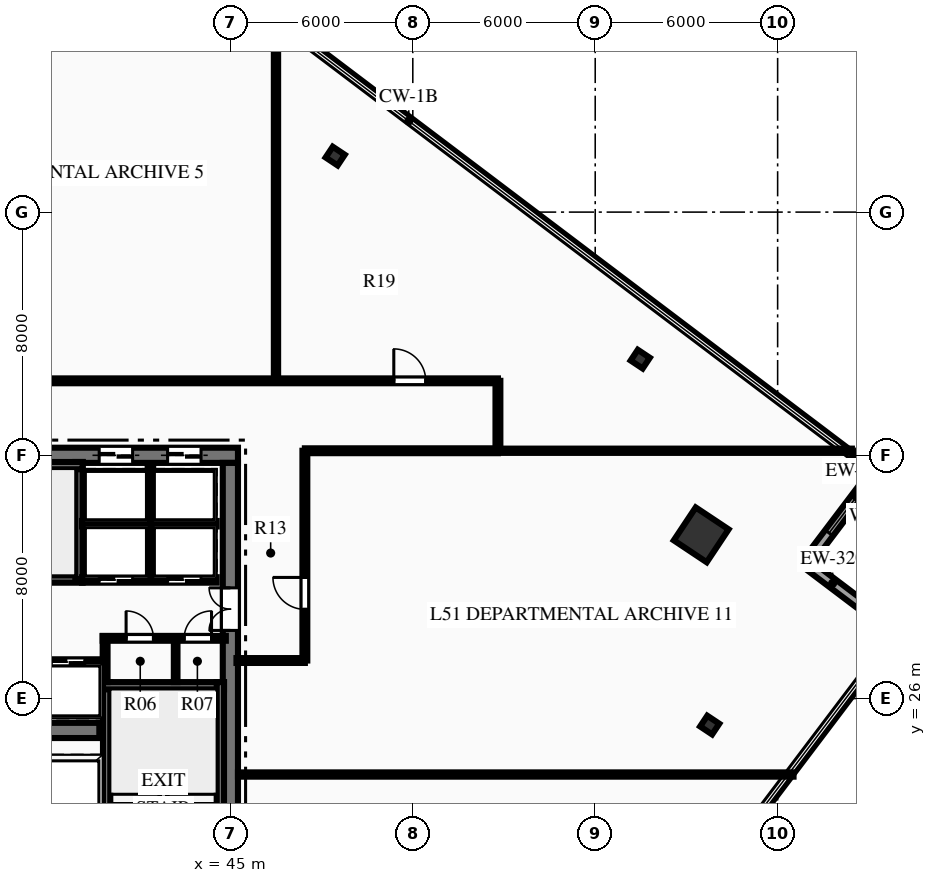
"""IFC4 building model, lengths in metres.
Left out: names, types, materials, properties, quantities, classifications, styles, units other than length and angle.
Written with IfcOpenShell. Run it as: python <this file> out.ifc"""

import sys

from ifc_helpers import new_model, si_unit, direction, frame, frame_2d, origin, origin_2d, place, context, subcontext, project, spatial, rectangle, hollow_rectangle, i_section, extrude, element, fill, save


model = new_model("IFC4")
c1 = context("Model", 3, precision=1e-05, world=origin(), true_north=direction((0.0, 1.0)))
c2 = subcontext(c1, "Body", "Model", "MODEL_VIEW")
j1 = project(units=[si_unit("LENGTHUNIT", "METRE"), si_unit("PLANEANGLEUNIT", "RADIAN")], contexts=[c1])
p1 = place(None, origin())
s1 = spatial("IfcSite", under=j1, at=p1, CompositionType="ELEMENT")
p2 = place(p1, origin())
s2 = spatial("IfcBuilding", under=s1, at=p2, CompositionType="ELEMENT")
p3 = place(p2, frame((0.0, 0.0, 205.95)))
s3 = spatial("IfcBuildingStorey", under=s2, at=p3, CompositionType="ELEMENT", Elevation=205.95)
p4 = place(p3, frame((26.75, 34.0, 0.0), z_axis=(0.0, 0.0, 1.0), x_axis=(1.0, 0.0, 0.0)))
e1 = element("IfcWall", 1, at=p4, inside=s3, PredefinedType="SHEAR", context=c2, shape_type="SweptSolid", body=[
    extrude(rectangle(XDim=18.5, YDim=0.5, at=frame_2d((9.25, 0.0))), origin(), (0.0, 0.0, 1.0), 3.75),
])
p5 = place(p4, frame((13.935, 0.0, 0.0)))
e2 = element("IfcOpeningElement", 2, at=p5, cuts=e1, PredefinedType="OPENING", context=c2, shape_type="SweptSolid", body=[
    extrude(rectangle(XDim=1.1, YDim=2.15, at=frame_2d((0.55, 1.075))), frame((0.0, 0.26, 0.0), z_axis=(0.0, -1.0, 0.0), x_axis=(1.0, 0.0, 0.0)), (0.0, 0.0, 1.0), 0.52),
])
p6 = place(p4, frame((16.185, 0.0, 0.0)))
e3 = element("IfcOpeningElement", 3, at=p6, cuts=e1, PredefinedType="OPENING", context=c2, shape_type="SweptSolid", body=[
    extrude(rectangle(XDim=1.1, YDim=2.15, at=frame_2d((0.55, 1.075))), frame((0.0, 0.26, 0.0), z_axis=(0.0, -1.0, 0.0), x_axis=(1.0, 0.0, 0.0)), (0.0, 0.0, 1.0), 0.52),
])
p7 = place(p3, frame((45.0, 18.25, 0.0), z_axis=(0.0, 0.0, 1.0), x_axis=(0.0, 1.0, 0.0)))
e4 = element("IfcWall", 4, at=p7, inside=s3, PredefinedType="SHEAR", context=c2, shape_type="SweptSolid", body=[
    extrude(rectangle(XDim=15.5, YDim=0.5, at=frame_2d((7.75, 0.0))), origin(), (0.0, 0.0, 1.0), 3.75),
])
p8 = place(p7, frame((9.99, 0.0, 0.0)))
e5 = element("IfcOpeningElement", 5, at=p8, cuts=e4, PredefinedType="OPENING", context=c2, shape_type="SweptSolid", body=[
    extrude(rectangle(XDim=1.4, YDim=2.2, at=frame_2d((0.7, 1.1))), frame((0.0, 0.26, 0.0), z_axis=(0.0, -1.0, 0.0), x_axis=(1.0, 0.0, 0.0)), (0.0, 0.0, 1.0), 0.52),
])
p9 = place(p3, frame((31.31, 24.95, 0.0), z_axis=(0.0, 0.0, 1.0), x_axis=(1.0, 0.0, 0.0)))
e6 = element("IfcWall", 6, at=p9, inside=s3, PredefinedType="SHEAR", context=c2, shape_type="SweptSolid", body=[
    extrude(rectangle(XDim=9.38, YDim=0.5, at=frame_2d((4.69, 0.0))), origin(), (0.0, 0.0, 1.0), 3.75),
])
p10 = place(p3, frame((40.93, 18.28, 0.0), z_axis=(0.0, 0.0, 1.0), x_axis=(0.0, 1.0, 0.0)))
e7 = element("IfcWall", 7, at=p10, inside=s3, PredefinedType="SHEAR", context=c2, shape_type="SweptSolid", body=[
    extrude(rectangle(XDim=8.26, YDim=0.24, at=frame_2d((4.13, 0.0))), origin(), (0.0, 0.0, 1.0), 3.75),
])
p11 = place(p10, frame((0.365, 0.0, 0.0)))
e8 = element("IfcOpeningElement", 8, at=p11, cuts=e7, PredefinedType="OPENING", context=c2, shape_type="SweptSolid", body=[
    extrude(rectangle(XDim=1.05, YDim=2.15, at=frame_2d((0.525, 1.075))), frame((0.0, 0.13, 0.0), z_axis=(0.0, -1.0, 0.0), x_axis=(1.0, 0.0, 0.0)), (0.0, 0.0, 1.0), 0.26),
])
p12 = place(p3, frame((40.81, 26.42, 0.0), z_axis=(0.0, 0.0, 1.0), x_axis=(1.0, 0.0, 0.0)))
e9 = element("IfcWall", 9, at=p12, inside=s3, PredefinedType="SHEAR", context=c2, shape_type="SweptSolid", body=[
    extrude(rectangle(XDim=3.98, YDim=0.24, at=frame_2d((1.99, 0.0))), origin(), (0.0, 0.0, 1.0), 3.75),
])
p13 = place(p3, frame((44.67, 18.28, 0.0), z_axis=(0.0, 0.0, 1.0), x_axis=(0.0, 1.0, 0.0)))
e10 = element("IfcWall", 10, at=p13, inside=s3, PredefinedType="SHEAR", context=c2, shape_type="SweptSolid", body=[
    extrude(rectangle(XDim=8.26, YDim=0.24, at=frame_2d((4.13, 0.0))), origin(), (0.0, 0.0, 1.0), 3.75),
])
p14 = place(p3, frame((31.76, 29.93, 0.0), z_axis=(0.0, 0.0, 1.0), x_axis=(1.0, 0.0, 0.0)))
e11 = element("IfcWall", 11, at=p14, inside=s3, PredefinedType="SHEAR", context=c2, shape_type="SweptSolid", body=[
    extrude(rectangle(XDim=8.38, YDim=0.24, at=frame_2d((4.19, 0.0))), origin(), (0.0, 0.0, 1.0), 3.75),
])
p15 = place(p14, frame((0.565, 0.0, 0.0)))
e12 = element("IfcOpeningElement", 12, at=p15, cuts=e11, PredefinedType="OPENING", context=c2, shape_type="SweptSolid", body=[
    extrude(rectangle(XDim=1.05, YDim=2.15, at=frame_2d((0.525, 1.075))), frame((0.0, 0.13, 0.0), z_axis=(0.0, -1.0, 0.0), x_axis=(1.0, 0.0, 0.0)), (0.0, 0.0, 1.0), 0.26),
])
p16 = place(p3, frame((40.02, 29.93, 0.0), z_axis=(0.0, 0.0, 1.0), x_axis=(0.0, 1.0, 0.0)))
e13 = element("IfcWall", 13, at=p16, inside=s3, PredefinedType="SHEAR", context=c2, shape_type="SweptSolid", body=[
    extrude(rectangle(XDim=3.85, YDim=0.24, at=frame_2d((1.925, 0.0))), origin(), (0.0, 0.0, 1.0), 3.75),
])
p17 = place(p3, frame((37.85, 33.66, 0.0), z_axis=(0.0, 0.0, 1.0), x_axis=(1.0, 0.0, 0.0)))
e14 = element("IfcWall", 14, at=p17, inside=s3, PredefinedType="SHEAR", context=c2, shape_type="SweptSolid", body=[
    extrude(rectangle(XDim=2.29, YDim=0.24, at=frame_2d((1.145, 0.0))), origin(), (0.0, 0.0, 1.0), 3.75),
])
p18 = place(p3, frame((60.486, 31.384, 0.0), z_axis=(0.0, 0.0, 1.0), x_axis=(0.554118199338, 0.832437998389, 0.0)))
e15 = element("IfcColumn", 15, at=p18, inside=s3, PredefinedType="COLUMN", context=c2, shape_type="SweptSolid", body=[
    extrude(hollow_rectangle(XDim=1.3, YDim=1.3, WallThickness=0.06, at=origin_2d()), origin(), (0.0, 0.0, 1.0), 3.75),
])
for number, where, z_axis, x_axis in (
    (16, (60.766, 25.126, 0.0), (0.0, 0.0, 1.0), (0.554, 0.832, 0.0)),
    (17, (58.481, 37.164, 0.0), (0.0, 0.0, 1.0), (0.554, 0.832, 0.0)),
    (18, (48.448, 43.842, 0.0), (0.0, 0.0, 1.0), (0.554, 0.832, 0.0)),
):
    element("IfcColumn", number, at=place(p3, frame(where, z_axis=z_axis, x_axis=x_axis)), inside=s3, PredefinedType="COLUMN", context=c2, shape_type="SweptSolid", body=[
        extrude(i_section(OverallWidth=0.424, OverallDepth=0.474, WebThickness=0.048, FlangeThickness=0.077, at=origin_2d()), origin(), (0.0, 0.0, 1.0), 3.75),
    ])
p19 = place(p3, frame((63.938, 30.448, 0.0), z_axis=(0.0, 0.0, 1.0), x_axis=(0.797582200659, -0.603210272784, 0.0)))
e19 = element("IfcWall", 19, at=p19, inside=s3, PredefinedType="STANDARD", context=c2, shape_type="SweptSolid", body=[
    extrude(rectangle(XDim=3.9, YDim=0.32, at=frame_2d((1.95, 0.0))), origin(), (0.0, 0.0, 1.0), 3.47),
])
p20 = place(p3, frame((66.291, 33.558, 0.0), z_axis=(0.0, 0.0, 1.0), x_axis=(-0.603210272784, -0.797582200659, 0.0)))
e20 = element("IfcWall", 20, at=p20, inside=s3, PredefinedType="STANDARD", context=c2, shape_type="SweptSolid", body=[
    extrude(rectangle(XDim=3.9, YDim=0.32, at=frame_2d((1.95, 0.0))), origin(), (0.0, 0.0, 1.0), 3.47),
])
p21 = place(p20, frame((1.25, 0.0, 0.85)))
e21 = element("IfcOpeningElement", 21, at=p21, cuts=e20, PredefinedType="OPENING", context=c2, shape_type="SweptSolid", body=[
    extrude(rectangle(XDim=1.4, YDim=2.0, at=frame_2d((0.7, 1.0))), frame((0.0, 0.17, 0.0), z_axis=(0.0, -1.0, 0.0), x_axis=(1.0, 0.0, 0.0)), (0.0, 0.0, 1.0), 0.34),
])
p22 = place(p3, frame((65.573, 34.101, 0.0), z_axis=(0.0, 0.0, 1.0), x_axis=(0.797519262261, -0.603293482745, 0.0)))
e22 = element("IfcWall", 22, at=p22, inside=s3, PredefinedType="STANDARD", context=c2, shape_type="SweptSolid", body=[
    extrude(rectangle(XDim=0.9, YDim=0.32, at=frame_2d((0.45, 0.0))), origin(), (0.0, 0.0, 1.0), 3.47),
])
p23 = place(p3, frame((40.8, 27.98, 0.0), z_axis=(0.0, 0.0, 1.0), x_axis=(1.0, 0.0, 0.0)))
e23 = element("IfcWall", 23, at=p23, inside=s3, PredefinedType="PARTITIONING", context=c2, shape_type="SweptSolid", body=[
    extrude(rectangle(XDim=4.05, YDim=0.16, at=frame_2d((2.025, 0.0))), origin(), (0.0, 0.0, 1.0), 3.47),
])
p24 = place(p23, frame((0.77, 0.0, 0.0)))
e24 = element("IfcOpeningElement", 24, at=p24, cuts=e23, PredefinedType="OPENING", context=c2, shape_type="SweptSolid", body=[
    extrude(rectangle(XDim=0.9, YDim=2.15, at=frame_2d((0.45, 1.075))), frame((0.0, 0.09, 0.0), z_axis=(0.0, -1.0, 0.0), x_axis=(1.0, 0.0, 0.0)), (0.0, 0.0, 1.0), 0.18),
])
p25 = place(p23, frame((2.68, 0.0, 0.0)))
e25 = element("IfcOpeningElement", 25, at=p25, cuts=e23, PredefinedType="OPENING", context=c2, shape_type="SweptSolid", body=[
    extrude(rectangle(XDim=0.9, YDim=2.15, at=frame_2d((0.45, 1.075))), frame((0.0, 0.09, 0.0), z_axis=(0.0, -1.0, 0.0), x_axis=(1.0, 0.0, 0.0)), (0.0, 0.0, 1.0), 0.18),
])
p26 = place(p3, frame((40.88, 26.54, 0.0), z_axis=(0.0, 0.0, 1.0), x_axis=(0.0, 1.0, 0.0)))
e26 = element("IfcWall", 26, at=p26, inside=s3, PredefinedType="PARTITIONING", context=c2, shape_type="SweptSolid", body=[
    extrude(rectangle(XDim=1.51, YDim=0.16, at=frame_2d((0.755, 0.0))), origin(), (0.0, 0.0, 1.0), 3.47),
])
p27 = place(p3, frame((43.2, 26.54, 0.0), z_axis=(0.0, 0.0, 1.0), x_axis=(0.0, 1.0, 0.0)))
e27 = element("IfcWall", 27, at=p27, inside=s3, PredefinedType="PARTITIONING", context=c2, shape_type="SweptSolid", body=[
    extrude(rectangle(XDim=1.44, YDim=0.12, at=frame_2d((0.72, 0.0))), origin(), (0.0, 0.0, 1.0), 3.47),
])
p28 = place(p3, frame((40.12, 29.9, 0.0), z_axis=(0.0, 0.0, 1.0), x_axis=(1.0, 0.0, 0.0)))
e28 = element("IfcWall", 28, at=p28, inside=s3, PredefinedType="PARTITIONING", context=c2, shape_type="SweptSolid", body=[
    extrude(rectangle(XDim=4.43, YDim=0.18, at=frame_2d((2.215, 0.0))), origin(), (0.0, 0.0, 1.0), 3.47),
])
p29 = place(p28, frame((0.565, 0.0, 0.0)))
e29 = element("IfcOpeningElement", 29, at=p29, cuts=e28, PredefinedType="OPENING", context=c2, shape_type="SweptSolid", body=[
    extrude(rectangle(XDim=1.1, YDim=2.15, at=frame_2d((0.55, 1.075))), frame((0.0, 0.1, 0.0), z_axis=(0.0, -1.0, 0.0), x_axis=(1.0, 0.0, 0.0)), (0.0, 0.0, 1.0), 0.2),
])
p30 = place(p28, frame((2.815, 0.0, 0.0)))
e30 = element("IfcOpeningElement", 30, at=p30, cuts=e28, PredefinedType="OPENING", context=c2, shape_type="SweptSolid", body=[
    extrude(rectangle(XDim=1.1, YDim=2.15, at=frame_2d((0.55, 1.075))), frame((0.0, 0.1, 0.0), z_axis=(0.0, -1.0, 0.0), x_axis=(1.0, 0.0, 0.0)), (0.0, 0.0, 1.0), 0.2),
])
p31 = place(p3, frame((40.12, 31.75, 0.0), z_axis=(0.0, 0.0, 1.0), x_axis=(1.0, 0.0, 0.0)))
e31 = element("IfcWall", 31, at=p31, inside=s3, PredefinedType="PARTITIONING", context=c2, shape_type="SweptSolid", body=[
    extrude(rectangle(XDim=4.43, YDim=0.18, at=frame_2d((2.215, 0.0))), origin(), (0.0, 0.0, 1.0), 3.47),
])
p32 = place(p3, frame((42.37, 29.9, 0.0), z_axis=(0.0, 0.0, 1.0), x_axis=(0.0, 1.0, 0.0)))
e32 = element("IfcWall", 32, at=p32, inside=s3, PredefinedType="PARTITIONING", context=c2, shape_type="SweptSolid", body=[
    extrude(rectangle(XDim=3.75, YDim=0.18, at=frame_2d((1.875, 0.0))), origin(), (0.0, 0.0, 1.0), 3.47),
])
p33 = place(p3, frame((31.2, 27.2, 0.0), z_axis=(0.0, 0.0, 1.0), x_axis=(1.0, 0.0, 0.0)))
e33 = element("IfcWall", 33, at=p33, inside=s3, PredefinedType="PARTITIONING", context=c2, shape_type="SweptSolid", body=[
    extrude(rectangle(XDim=9.6, YDim=0.18, at=frame_2d((4.8, 0.0))), origin(), (0.0, 0.0, 1.0), 3.47),
])
p34 = place(p33, frame((0.59, 0.0, 0.0)))
e34 = element("IfcOpeningElement", 34, at=p34, cuts=e33, PredefinedType="OPENING", context=c2, shape_type="SweptSolid", body=[
    extrude(rectangle(XDim=1.1, YDim=2.15, at=frame_2d((0.55, 1.075))), frame((0.0, 0.1, 0.0), z_axis=(0.0, -1.0, 0.0), x_axis=(1.0, 0.0, 0.0)), (0.0, 0.0, 1.0), 0.2),
])
p35 = place(p33, frame((2.99, 0.0, 0.0)))
e35 = element("IfcOpeningElement", 35, at=p35, cuts=e33, PredefinedType="OPENING", context=c2, shape_type="SweptSolid", body=[
    extrude(rectangle(XDim=1.1, YDim=2.15, at=frame_2d((0.55, 1.075))), frame((0.0, 0.1, 0.0), z_axis=(0.0, -1.0, 0.0), x_axis=(1.0, 0.0, 0.0)), (0.0, 0.0, 1.0), 0.2),
])
p36 = place(p33, frame((5.51, 0.0, 0.0)))
e36 = element("IfcOpeningElement", 36, at=p36, cuts=e33, PredefinedType="OPENING", context=c2, shape_type="SweptSolid", body=[
    extrude(rectangle(XDim=1.1, YDim=2.15, at=frame_2d((0.55, 1.075))), frame((0.0, 0.1, 0.0), z_axis=(0.0, -1.0, 0.0), x_axis=(1.0, 0.0, 0.0)), (0.0, 0.0, 1.0), 0.2),
])
p37 = place(p33, frame((7.91, 0.0, 0.0)))
e37 = element("IfcOpeningElement", 37, at=p37, cuts=e33, PredefinedType="OPENING", context=c2, shape_type="SweptSolid", body=[
    extrude(rectangle(XDim=1.1, YDim=2.15, at=frame_2d((0.55, 1.075))), frame((0.0, 0.1, 0.0), z_axis=(0.0, -1.0, 0.0), x_axis=(1.0, 0.0, 0.0)), (0.0, 0.0, 1.0), 0.2),
])
p38 = place(p3, frame((18.2, 36.45, 0.0), z_axis=(0.0, 0.0, 1.0), x_axis=(1.0, 0.0, 0.0)))
e38 = element("IfcWall", 38, at=p38, inside=s3, PredefinedType="PARTITIONING", context=c2, shape_type="SweptSolid", body=[
    extrude(rectangle(XDim=35.6, YDim=0.16, at=frame_2d((17.8, 0.0))), origin(), (0.0, 0.0, 1.0), 2.849),
])
p39 = place(p38, frame((2.965, 0.0, 0.0)))
e39 = element("IfcOpeningElement", 39, at=p39, cuts=e38, PredefinedType="OPENING", context=c2, shape_type="SweptSolid", body=[
    extrude(rectangle(XDim=1.05, YDim=2.15, at=frame_2d((0.525, 1.075))), frame((0.0, 0.09, 0.0), z_axis=(0.0, -1.0, 0.0), x_axis=(1.0, 0.0, 0.0)), (0.0, 0.0, 1.0), 0.18),
])
p40 = place(p38, frame((10.855, 0.0, 0.0)))
e40 = element("IfcOpeningElement", 40, at=p40, cuts=e38, PredefinedType="OPENING", context=c2, shape_type="SweptSolid", body=[
    extrude(rectangle(XDim=1.05, YDim=2.15, at=frame_2d((0.525, 1.075))), frame((0.0, 0.09, 0.0), z_axis=(0.0, -1.0, 0.0), x_axis=(1.0, 0.0, 0.0)), (0.0, 0.0, 1.0), 0.18),
])
p41 = place(p38, frame((18.135, 0.0, 0.0)))
e41 = element("IfcOpeningElement", 41, at=p41, cuts=e38, PredefinedType="OPENING", context=c2, shape_type="SweptSolid", body=[
    extrude(rectangle(XDim=1.05, YDim=2.15, at=frame_2d((0.525, 1.075))), frame((0.0, 0.09, 0.0), z_axis=(0.0, -1.0, 0.0), x_axis=(1.0, 0.0, 0.0)), (0.0, 0.0, 1.0), 0.18),
])
p42 = place(p38, frame((32.175, 0.0, 0.0)))
e42 = element("IfcOpeningElement", 42, at=p42, cuts=e38, PredefinedType="OPENING", context=c2, shape_type="SweptSolid", body=[
    extrude(rectangle(XDim=1.05, YDim=2.15, at=frame_2d((0.525, 1.075))), frame((0.0, 0.09, 0.0), z_axis=(0.0, -1.0, 0.0), x_axis=(1.0, 0.0, 0.0)), (0.0, 0.0, 1.0), 0.18),
])
p43 = place(p3, frame((47.45, 34.15, 0.0), z_axis=(0.0, 0.0, 1.0), x_axis=(1.0, 0.0, 0.0)))
e43 = element("IfcWall", 43, at=p43, inside=s3, PredefinedType="PARTITIONING", context=c2, shape_type="SweptSolid", body=[
    extrude(rectangle(XDim=6.35, YDim=0.16, at=frame_2d((3.175, 0.0))), origin(), (0.0, 0.0, 1.0), 3.47),
])
p44 = place(p3, frame((47.45, 27.25, 0.0), z_axis=(0.0, 0.0, 1.0), x_axis=(0.0, 1.0, 0.0)))
e44 = element("IfcWall", 44, at=p44, inside=s3, PredefinedType="PARTITIONING", context=c2, shape_type="SweptSolid", body=[
    extrude(rectangle(XDim=6.9, YDim=0.16, at=frame_2d((3.45, 0.0))), origin(), (0.0, 0.0, 1.0), 3.47),
])
p45 = place(p44, frame((1.683, 0.0, 0.0)))
e45 = element("IfcOpeningElement", 45, at=p45, cuts=e44, PredefinedType="OPENING", context=c2, shape_type="SweptSolid", body=[
    extrude(rectangle(XDim=1.05, YDim=2.15, at=frame_2d((0.525, 1.075))), frame((0.0, 0.09, 0.0), z_axis=(0.0, -1.0, 0.0), x_axis=(1.0, 0.0, 0.0)), (0.0, 0.0, 1.0), 0.18),
])
p46 = place(p3, frame((45.2, 27.25, 0.0), z_axis=(0.0, 0.0, 1.0), x_axis=(1.0, 0.0, 0.0)))
e46 = element("IfcWall", 46, at=p46, inside=s3, PredefinedType="PARTITIONING", context=c2, shape_type="SweptSolid", body=[
    extrude(rectangle(XDim=2.25, YDim=0.16, at=frame_2d((1.125, 0.0))), origin(), (0.0, 0.0, 1.0), 3.47),
])
p47 = place(p3, frame((53.8, 34.15, 0.0), z_axis=(0.0, 0.0, 1.0), x_axis=(0.0, 1.0, 0.0)))
e47 = element("IfcWall", 47, at=p47, inside=s3, PredefinedType="PARTITIONING", context=c2, shape_type="SweptSolid", body=[
    extrude(rectangle(XDim=2.3, YDim=0.16, at=frame_2d((1.15, 0.0))), origin(), (0.0, 0.0, 1.0), 3.47),
])
p48 = place(p3, frame((53.8, 34.15, 0.0), z_axis=(0.0, 0.0, 1.0), x_axis=(1.0, 0.0, 0.0)))
e48 = element("IfcWall", 48, at=p48, inside=s3, PredefinedType="PARTITIONING", context=c2, shape_type="SweptSolid", body=[
    extrude(rectangle(XDim=11.642, YDim=0.14, at=frame_2d((5.821, 0.0))), origin(), (0.0, 0.0, 1.0), 3.47),
])
p49 = place(p3, frame((46.5, 36.45, 0.0), z_axis=(0.0, 0.0, 1.0), x_axis=(0.0, 1.0, 0.0)))
e49 = element("IfcWall", 49, at=p49, inside=s3, PredefinedType="PARTITIONING", context=c2, shape_type="SweptSolid", body=[
    extrude(rectangle(XDim=12.026, YDim=0.14, at=frame_2d((6.013, 0.0))), origin(), (0.0, 0.0, 1.0), 2.849),
])
p50 = place(p3, frame((45.25, 23.5, 0.0), z_axis=(0.0, 0.0, 1.0), x_axis=(1.0, 0.0, 0.0)))
e50 = element("IfcWall", 50, at=p50, inside=s3, PredefinedType="PARTITIONING", context=c2, shape_type="SweptSolid", body=[
    extrude(rectangle(XDim=18.273, YDim=0.14, at=frame_2d((9.137, 0.0))), origin(), (0.0, 0.0, 1.0), 3.47),
])
p51 = place(p21, origin())
e51 = element("IfcWindow", 51, at=p51, inside=s3, PartitioningType="SINGLE_PANEL", PredefinedType="WINDOW", context=c2, shape_type="SweptSolid", body=[
    extrude(rectangle(XDim=1.4, YDim=2.0, at=frame_2d((0.7, 1.0))), frame((0.0, 0.03, 0.0), z_axis=(0.0, -1.0, 0.0), x_axis=(1.0, 0.0, 0.0)), (0.0, 0.0, 1.0), 0.06),
])
fill(e21, e51)
p52 = place(p24, origin())
e52 = element("IfcDoor", 52, at=p52, inside=s3, OperationType="SINGLE_SWING_LEFT", PredefinedType="DOOR", context=c2, shape_type="SweptSolid", body=[
    extrude(rectangle(XDim=0.9, YDim=2.15, at=frame_2d((0.45, 1.075))), frame((0.0, 0.025, 0.0), z_axis=(0.0, -1.0, 0.0), x_axis=(1.0, 0.0, 0.0)), (0.0, 0.0, 1.0), 0.05),
])
fill(e24, e52)
p53 = place(p25, origin())
e53 = element("IfcDoor", 53, at=p53, inside=s3, OperationType="SINGLE_SWING_RIGHT", PredefinedType="DOOR", context=c2, shape_type="SweptSolid", body=[
    extrude(rectangle(XDim=0.9, YDim=2.15, at=frame_2d((0.45, 1.075))), frame((0.0, 0.025, 0.0), z_axis=(0.0, -1.0, 0.0), x_axis=(1.0, 0.0, 0.0)), (0.0, 0.0, 1.0), 0.05),
])
fill(e25, e53)
p54 = place(p8, origin())
e54 = element("IfcDoor", 54, at=p54, inside=s3, OperationType="DOUBLE_DOOR_SINGLE_SWING", PredefinedType="DOOR", context=c2, shape_type="SweptSolid", body=[
    extrude(rectangle(XDim=1.4, YDim=2.2, at=frame_2d((0.7, 1.1))), frame((0.0, 0.025, 0.0), z_axis=(0.0, -1.0, 0.0), x_axis=(1.0, 0.0, 0.0)), (0.0, 0.0, 1.0), 0.05),
])
fill(e5, e54)
p55 = place(p42, origin())
e55 = element("IfcDoor", 55, at=p55, inside=s3, OperationType="SINGLE_SWING_LEFT", PredefinedType="DOOR", context=c2, shape_type="SweptSolid", body=[
    extrude(rectangle(XDim=1.05, YDim=2.15, at=frame_2d((0.525, 1.075))), frame((0.0, 0.025, 0.0), z_axis=(0.0, -1.0, 0.0), x_axis=(1.0, 0.0, 0.0)), (0.0, 0.0, 1.0), 0.05),
])
fill(e42, e55)
p56 = place(p45, origin())
e56 = element("IfcDoor", 56, at=p56, inside=s3, OperationType="SINGLE_SWING_RIGHT", PredefinedType="DOOR", context=c2, shape_type="SweptSolid", body=[
    extrude(rectangle(XDim=1.05, YDim=2.15, at=frame_2d((0.525, 1.075))), frame((0.0, 0.025, 0.0), z_axis=(0.0, -1.0, 0.0), x_axis=(1.0, 0.0, 0.0)), (0.0, 0.0, 1.0), 0.05),
])
fill(e45, e56)
p57 = place(p29, origin())
e57 = element("IfcDoor", 57, at=p57, inside=s3, OperationType="SLIDING_TO_LEFT", PredefinedType="DOOR", context=c2, shape_type="SweptSolid", body=[
    extrude(rectangle(XDim=1.1, YDim=2.15, at=frame_2d((0.55, 1.075))), frame((0.0, 0.025, 0.0), z_axis=(0.0, -1.0, 0.0), x_axis=(1.0, 0.0, 0.0)), (0.0, 0.0, 1.0), 0.05),
])
fill(e29, e57)
p58 = place(p30, origin())
e58 = element("IfcDoor", 58, at=p58, inside=s3, OperationType="SLIDING_TO_LEFT", PredefinedType="DOOR", context=c2, shape_type="SweptSolid", body=[
    extrude(rectangle(XDim=1.1, YDim=2.15, at=frame_2d((0.55, 1.075))), frame((0.0, 0.025, 0.0), z_axis=(0.0, -1.0, 0.0), x_axis=(1.0, 0.0, 0.0)), (0.0, 0.0, 1.0), 0.05),
])
fill(e30, e58)
p59 = place(p5, origin())
e59 = element("IfcDoor", 59, at=p59, inside=s3, OperationType="SLIDING_TO_LEFT", PredefinedType="DOOR", context=c2, shape_type="SweptSolid", body=[
    extrude(rectangle(XDim=1.1, YDim=2.15, at=frame_2d((0.55, 1.075))), frame((0.0, 0.025, 0.0), z_axis=(0.0, -1.0, 0.0), x_axis=(1.0, 0.0, 0.0)), (0.0, 0.0, 1.0), 0.05),
])
fill(e2, e59)
p60 = place(p6, origin())
e60 = element("IfcDoor", 60, at=p60, inside=s3, OperationType="SLIDING_TO_LEFT", PredefinedType="DOOR", context=c2, shape_type="SweptSolid", body=[
    extrude(rectangle(XDim=1.1, YDim=2.15, at=frame_2d((0.55, 1.075))), frame((0.0, 0.025, 0.0), z_axis=(0.0, -1.0, 0.0), x_axis=(1.0, 0.0, 0.0)), (0.0, 0.0, 1.0), 0.05),
])
fill(e3, e60)
p61 = place(p37, origin())
e61 = element("IfcDoor", 61, at=p61, inside=s3, OperationType="SLIDING_TO_LEFT", PredefinedType="DOOR", context=c2, shape_type="SweptSolid", body=[
    extrude(rectangle(XDim=1.1, YDim=2.15, at=frame_2d((0.55, 1.075))), frame((0.0, 0.025, 0.0), z_axis=(0.0, -1.0, 0.0), x_axis=(1.0, 0.0, 0.0)), (0.0, 0.0, 1.0), 0.05),
])
fill(e37, e61)
save(model, sys.argv[1])
